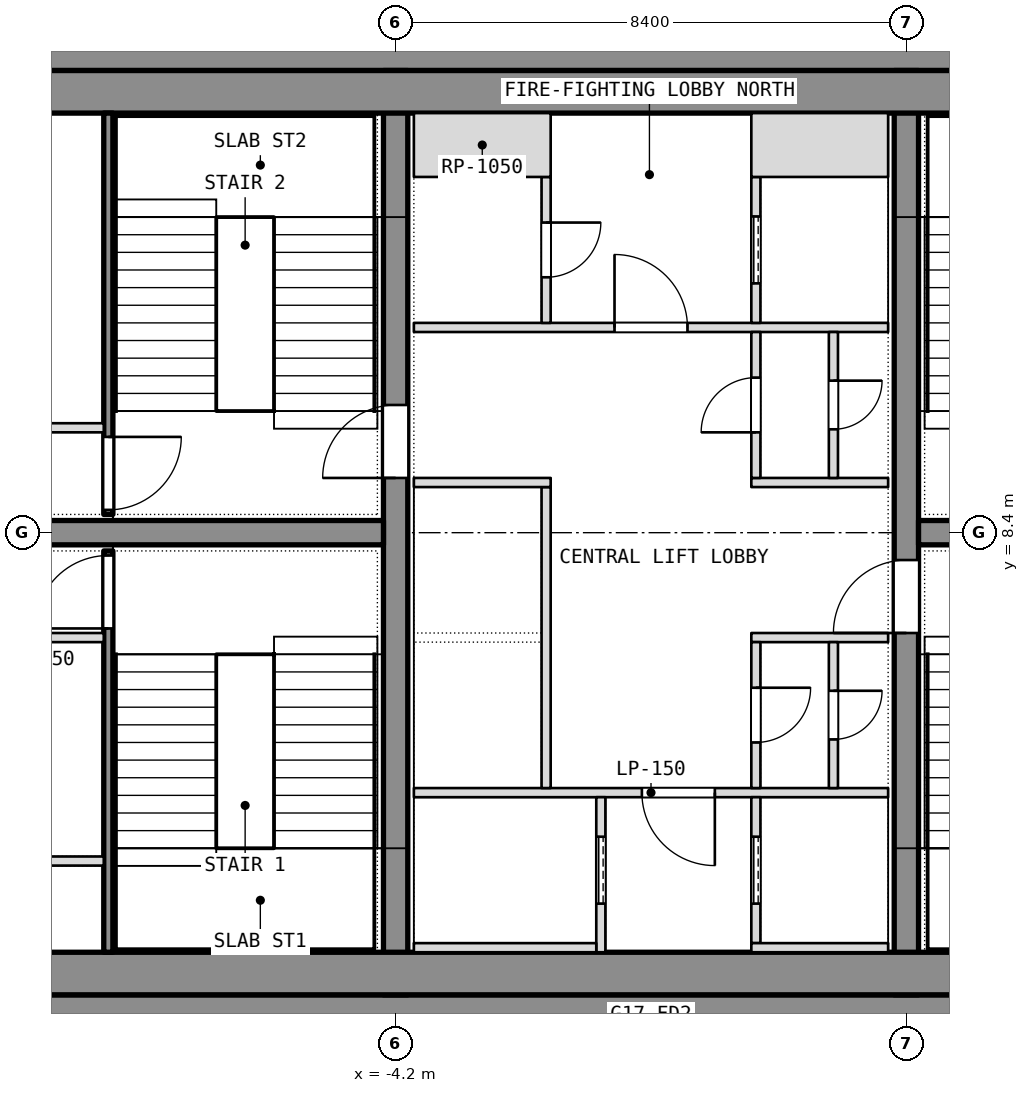
"""IFC4 building model, lengths in metres.
Left out: names, types, materials, properties, quantities, classifications, styles, units other than length and angle.
Written with IfcOpenShell. Run it as: python <this file> out.ifc"""

import sys

from ifc_helpers import new_model, si_unit, direction, frame, frame_2d, origin, place, context, subcontext, project, spatial, rectangle, extrude, element, fill, save


model = new_model("IFC4")
c1 = context("Model", 3, precision=1e-05, world=origin(), true_north=direction((0.0, 1.0)))
c2 = subcontext(c1, "Body", "Model", "MODEL_VIEW")
j1 = project(units=[si_unit("LENGTHUNIT", "METRE"), si_unit("PLANEANGLEUNIT", "RADIAN")], contexts=[c1])
p1 = place(None, origin())
s1 = spatial("IfcSite", under=j1, at=p1, CompositionType="ELEMENT")
p2 = place(p1, origin())
s2 = spatial("IfcBuilding", under=s1, at=p2, CompositionType="ELEMENT")
p3 = place(p2, frame((0.0, 0.0, 209.3)))
s3 = spatial("IfcBuildingStorey", under=s2, at=p3, CompositionType="ELEMENT", Elevation=209.3)
for number, where, z_axis, x_axis in (
    (1, (-11.1, 0.4, 0.0), (0.0, 0.0, 1.0), (1.0, 0.0, 0.0)),
    (2, (-11.1, 16.4, 0.0), (0.0, 0.0, 1.0), (1.0, 0.0, 0.0)),
):
    element("IfcWall", number, at=place(p3, frame(where, z_axis=z_axis, x_axis=x_axis)), inside=s3, PredefinedType="SHEAR", context=c2, shape_type="SweptSolid", body=[
        extrude(rectangle(XDim=22.2, YDim=0.8, at=frame_2d((11.1, 0.0))), origin(), (0.0, 0.0, 1.0), 3.6),
    ])
p4 = place(p3, frame((-4.2, 0.8, 0.0), z_axis=(0.0, 0.0, 1.0), x_axis=(0.0, 1.0, 0.0)))
e3 = element("IfcWall", 3, at=p4, inside=s3, PredefinedType="SHEAR", context=c2, shape_type="SweptSolid", body=[
    extrude(rectangle(XDim=15.2, YDim=0.4, at=frame_2d((7.6, 0.0))), origin(), (0.0, 0.0, 1.0), 3.6),
])
p5 = place(p4, frame((8.5, 0.0, 0.0)))
e4 = element("IfcOpeningElement", 4, at=p5, cuts=e3, PredefinedType="OPENING", context=c2, shape_type="SweptSolid", body=[
    extrude(rectangle(XDim=1.2, YDim=2.1, at=frame_2d((0.6, 1.05))), frame((0.0, 0.2, 0.0), z_axis=(0.0, -1.0, 0.0), x_axis=(1.0, 0.0, 0.0)), (0.0, 0.0, 1.0), 0.4),
])
p6 = place(p3, frame((4.2, 0.8, 0.0), z_axis=(0.0, 0.0, 1.0), x_axis=(0.0, 1.0, 0.0)))
e5 = element("IfcWall", 5, at=p6, inside=s3, PredefinedType="SHEAR", context=c2, shape_type="SweptSolid", body=[
    extrude(rectangle(XDim=15.2, YDim=0.4, at=frame_2d((7.6, 0.0))), origin(), (0.0, 0.0, 1.0), 3.6),
])
p7 = place(p6, frame((5.95, 0.0, 0.0)))
e6 = element("IfcOpeningElement", 6, at=p7, cuts=e5, PredefinedType="OPENING", context=c2, shape_type="SweptSolid", body=[
    extrude(rectangle(XDim=1.2, YDim=2.1, at=frame_2d((0.6, 1.05))), frame((0.0, 0.2, 0.0), z_axis=(0.0, -1.0, 0.0), x_axis=(1.0, 0.0, 0.0)), (0.0, 0.0, 1.0), 0.4),
])
for number, where, z_axis, x_axis in (
    (7, (-11.1, 8.4, 0.0), (0.0, 0.0, 1.0), (1.0, 0.0, 0.0)),
    (8, (4.4, 8.4, 0.0), (0.0, 0.0, 1.0), (1.0, 0.0, 0.0)),
):
    element("IfcWall", number, at=place(p3, frame(where, z_axis=z_axis, x_axis=x_axis)), inside=s3, PredefinedType="SHEAR", context=c2, shape_type="SweptSolid", body=[
        extrude(rectangle(XDim=6.7, YDim=0.4, at=frame_2d((3.35, 0.0))), origin(), (0.0, 0.0, 1.0), 3.6),
    ])
for number, where, z_axis, x_axis in (
    (9, (-11.1, 1.15, 0.0), (0.0, 0.0, 1.0), (1.0, 0.0, 0.0)),
    (10, (-11.1, 15.65, 0.0), (0.0, 0.0, 1.0), (1.0, 0.0, 0.0)),
):
    element("IfcWall", number, at=place(p3, frame(where, z_axis=z_axis, x_axis=x_axis)), inside=s3, PredefinedType="PARTITIONING", context=c2, shape_type="SweptSolid", body=[
        extrude(rectangle(XDim=22.2, YDim=0.7, at=frame_2d((11.1, 0.0))), origin(), (0.0, 0.0, 1.0), 3.34),
    ])
p8 = place(p3, frame((-8.925, 1.5, 0.0), z_axis=(0.0, 0.0, 1.0), x_axis=(0.0, 1.0, 0.0)))
e11 = element("IfcWall", 11, at=p8, inside=s3, PredefinedType="SHEAR", context=c2, shape_type="SweptSolid", body=[
    extrude(rectangle(XDim=6.6, YDim=0.15, at=frame_2d((3.3, 0.0))), origin(), (0.0, 0.0, 1.0), 3.34),
])
p9 = place(p8, frame((5.325, 0.0, 0.0)))
e12 = element("IfcOpeningElement", 12, at=p9, cuts=e11, PredefinedType="OPENING", context=c2, shape_type="SweptSolid", body=[
    extrude(rectangle(XDim=1.2, YDim=2.1, at=frame_2d((0.6, 1.05))), frame((0.0, 0.075, 0.0), z_axis=(0.0, -1.0, 0.0), x_axis=(1.0, 0.0, 0.0)), (0.0, 0.0, 1.0), 0.15),
])
for number, where, z_axis, x_axis in (
    (13, (-11.1, 6.675, 0.0), (0.0, 0.0, 1.0), (1.0, 0.0, 0.0)),
    (14, (-11.1, 3.0, 0.0), (0.0, 0.0, 1.0), (1.0, 0.0, 0.0)),
):
    element("IfcWall", number, at=place(p3, frame(where, z_axis=z_axis, x_axis=x_axis)), inside=s3, PredefinedType="PARTITIONING", context=c2, shape_type="SweptSolid", body=[
        extrude(rectangle(XDim=2.1, YDim=0.15, at=frame_2d((1.05, 0.0))), origin(), (0.0, 0.0, 1.0), 3.34),
    ])
p10 = place(p3, frame((-8.925, 8.7, 0.0), z_axis=(0.0, 0.0, 1.0), x_axis=(0.0, 1.0, 0.0)))
e15 = element("IfcWall", 15, at=p10, inside=s3, PredefinedType="SHEAR", context=c2, shape_type="SweptSolid", body=[
    extrude(rectangle(XDim=6.6, YDim=0.15, at=frame_2d((3.3, 0.0))), origin(), (0.0, 0.0, 1.0), 3.34),
])
p11 = place(p10, frame((0.075, 0.0, 0.0)))
e16 = element("IfcOpeningElement", 16, at=p11, cuts=e15, PredefinedType="OPENING", context=c2, shape_type="SweptSolid", body=[
    extrude(rectangle(XDim=1.2, YDim=2.1, at=frame_2d((0.6, 1.05))), frame((0.0, 0.075, 0.0), z_axis=(0.0, -1.0, 0.0), x_axis=(1.0, 0.0, 0.0)), (0.0, 0.0, 1.0), 0.15),
])
p12 = place(p3, frame((-11.1, 10.125, 0.0), z_axis=(0.0, 0.0, 1.0), x_axis=(1.0, 0.0, 0.0)))
e17 = element("IfcWall", 17, at=p12, inside=s3, PredefinedType="PARTITIONING", context=c2, shape_type="SweptSolid", body=[
    extrude(rectangle(XDim=2.1, YDim=0.15, at=frame_2d((1.05, 0.0))), origin(), (0.0, 0.0, 1.0), 3.34),
])
p13 = place(p3, frame((-3.9, 4.125, 0.0), z_axis=(0.0, 0.0, 1.0), x_axis=(1.0, 0.0, 0.0)))
e18 = element("IfcWall", 18, at=p13, inside=s3, PredefinedType="PARTITIONING", context=c2, shape_type="SweptSolid", body=[
    extrude(rectangle(XDim=7.8, YDim=0.15, at=frame_2d((3.9, 0.0))), origin(), (0.0, 0.0, 1.0), 3.34),
])
p14 = place(p13, frame((3.75, 0.0, 0.0)))
e19 = element("IfcOpeningElement", 19, at=p14, cuts=e18, PredefinedType="OPENING", context=c2, shape_type="SweptSolid", body=[
    extrude(rectangle(XDim=1.2, YDim=2.1, at=frame_2d((0.6, 1.05))), frame((0.0, 0.075, 0.0), z_axis=(0.0, -1.0, 0.0), x_axis=(1.0, 0.0, 0.0)), (0.0, 0.0, 1.0), 0.15),
])
p15 = place(p3, frame((-3.9, 11.775, 0.0), z_axis=(0.0, 0.0, 1.0), x_axis=(1.0, 0.0, 0.0)))
e20 = element("IfcWall", 20, at=p15, inside=s3, PredefinedType="PARTITIONING", context=c2, shape_type="SweptSolid", body=[
    extrude(rectangle(XDim=7.8, YDim=0.15, at=frame_2d((3.9, 0.0))), origin(), (0.0, 0.0, 1.0), 3.34),
])
p16 = place(p15, frame((3.3, 0.0, 0.0)))
e21 = element("IfcOpeningElement", 21, at=p16, cuts=e20, PredefinedType="OPENING", context=c2, shape_type="SweptSolid", body=[
    extrude(rectangle(XDim=1.2, YDim=2.1, at=frame_2d((0.6, 1.05))), frame((0.0, 0.075, 0.0), z_axis=(0.0, -1.0, 0.0), x_axis=(1.0, 0.0, 0.0)), (0.0, 0.0, 1.0), 0.15),
])
p17 = place(p3, frame((-0.825, 1.5, 0.0), z_axis=(0.0, 0.0, 1.0), x_axis=(0.0, 1.0, 0.0)))
e22 = element("IfcWall", 22, at=p17, inside=s3, PredefinedType="SHEAR", context=c2, shape_type="SweptSolid", body=[
    extrude(rectangle(XDim=2.55, YDim=0.15, at=frame_2d((1.275, 0.0))), origin(), (0.0, 0.0, 1.0), 3.6),
])
p18 = place(p17, frame((0.8, 0.0, 0.0)))
e23 = element("IfcOpeningElement", 23, at=p18, cuts=e22, PredefinedType="OPENING", context=c2, shape_type="SweptSolid", body=[
    extrude(rectangle(XDim=1.1, YDim=2.1, at=frame_2d((0.55, 1.05))), frame((0.0, 0.075, 0.0), z_axis=(0.0, -1.0, 0.0), x_axis=(1.0, 0.0, 0.0)), (0.0, 0.0, 1.0), 0.15),
])
p19 = place(p3, frame((-3.9, 1.575, 0.0), z_axis=(0.0, 0.0, 1.0), x_axis=(1.0, 0.0, 0.0)))
e24 = element("IfcWall", 24, at=p19, inside=s3, PredefinedType="SHEAR", context=c2, shape_type="SweptSolid", body=[
    extrude(rectangle(XDim=3.0, YDim=0.15, at=frame_2d((1.5, 0.0))), origin(), (0.0, 0.0, 1.0), 3.6),
])
p20 = place(p3, frame((-1.725, 4.2, 0.0), z_axis=(0.0, 0.0, 1.0), x_axis=(0.0, 1.0, 0.0)))
e25 = element("IfcWall", 25, at=p20, inside=s3, PredefinedType="SHEAR", context=c2, shape_type="SweptSolid", body=[
    extrude(rectangle(XDim=4.95, YDim=0.15, at=frame_2d((2.475, 0.0))), origin(), (0.0, 0.0, 1.0), 3.6),
])
p21 = place(p3, frame((-3.9, 9.225, 0.0), z_axis=(0.0, 0.0, 1.0), x_axis=(1.0, 0.0, 0.0)))
e26 = element("IfcWall", 26, at=p21, inside=s3, PredefinedType="SHEAR", context=c2, shape_type="SweptSolid", body=[
    extrude(rectangle(XDim=2.25, YDim=0.15, at=frame_2d((1.125, 0.0))), origin(), (0.0, 0.0, 1.0), 3.6),
])
p22 = place(p3, frame((-1.725, 11.85, 0.0), z_axis=(0.0, 0.0, 1.0), x_axis=(0.0, 1.0, 0.0)))
e27 = element("IfcWall", 27, at=p22, inside=s3, PredefinedType="PARTITIONING", context=c2, shape_type="SweptSolid", body=[
    extrude(rectangle(XDim=2.4, YDim=0.15, at=frame_2d((1.2, 0.0))), origin(), (0.0, 0.0, 1.0), 3.34),
])
p23 = place(p22, frame((0.75, 0.0, 0.0)))
e28 = element("IfcOpeningElement", 28, at=p23, cuts=e27, PredefinedType="OPENING", context=c2, shape_type="SweptSolid", body=[
    extrude(rectangle(XDim=0.9, YDim=2.1, at=frame_2d((0.45, 1.05))), frame((0.0, 0.075, 0.0), z_axis=(0.0, -1.0, 0.0), x_axis=(1.0, 0.0, 0.0)), (0.0, 0.0, 1.0), 0.15),
])
p24 = place(p3, frame((-3.9, 14.775, 0.0), z_axis=(0.0, 0.0, 1.0), x_axis=(1.0, 0.0, 0.0)))
e29 = element("IfcWall", 29, at=p24, inside=s3, PredefinedType="PARTITIONING", context=c2, shape_type="SweptSolid", body=[
    extrude(rectangle(XDim=2.25, YDim=1.05, at=frame_2d((1.125, 0.0))), origin(), (0.0, 0.0, 1.0), 3.34),
])
p25 = place(p3, frame((1.725, 1.65, 0.0), z_axis=(0.0, 0.0, 1.0), x_axis=(0.0, 1.0, 0.0)))
e30 = element("IfcWall", 30, at=p25, inside=s3, PredefinedType="SHEAR", context=c2, shape_type="SweptSolid", body=[
    extrude(rectangle(XDim=2.4, YDim=0.15, at=frame_2d((1.2, 0.0))), origin(), (0.0, 0.0, 1.0), 3.6),
])
p26 = place(p25, frame((0.65, 0.0, 0.0)))
e31 = element("IfcOpeningElement", 31, at=p26, cuts=e30, PredefinedType="OPENING", context=c2, shape_type="SweptSolid", body=[
    extrude(rectangle(XDim=1.1, YDim=2.1, at=frame_2d((0.55, 1.05))), frame((0.0, 0.075, 0.0), z_axis=(0.0, -1.0, 0.0), x_axis=(1.0, 0.0, 0.0)), (0.0, 0.0, 1.0), 0.15),
])
p27 = place(p3, frame((1.65, 1.575, 0.0), z_axis=(0.0, 0.0, 1.0), x_axis=(1.0, 0.0, 0.0)))
e32 = element("IfcWall", 32, at=p27, inside=s3, PredefinedType="SHEAR", context=c2, shape_type="SweptSolid", body=[
    extrude(rectangle(XDim=2.25, YDim=0.15, at=frame_2d((1.125, 0.0))), origin(), (0.0, 0.0, 1.0), 3.6),
])
p28 = place(p3, frame((1.725, 11.85, 0.0), z_axis=(0.0, 0.0, 1.0), x_axis=(0.0, 1.0, 0.0)))
e33 = element("IfcWall", 33, at=p28, inside=s3, PredefinedType="SHEAR", context=c2, shape_type="SweptSolid", body=[
    extrude(rectangle(XDim=2.4, YDim=0.15, at=frame_2d((1.2, 0.0))), origin(), (0.0, 0.0, 1.0), 3.6),
])
p29 = place(p28, frame((0.65, 0.0, 0.0)))
e34 = element("IfcOpeningElement", 34, at=p29, cuts=e33, PredefinedType="OPENING", context=c2, shape_type="SweptSolid", body=[
    extrude(rectangle(XDim=1.1, YDim=2.1, at=frame_2d((0.55, 1.05))), frame((0.0, 0.075, 0.0), z_axis=(0.0, -1.0, 0.0), x_axis=(1.0, 0.0, 0.0)), (0.0, 0.0, 1.0), 0.15),
])
p30 = place(p3, frame((1.65, 14.775, 0.0), z_axis=(0.0, 0.0, 1.0), x_axis=(1.0, 0.0, 0.0)))
e35 = element("IfcWall", 35, at=p30, inside=s3, PredefinedType="SHEAR", context=c2, shape_type="SweptSolid", body=[
    extrude(rectangle(XDim=2.25, YDim=1.05, at=frame_2d((1.125, 0.0))), origin(), (0.0, 0.0, 1.0), 3.6),
])
for number, where, z_axis, x_axis in (
    (36, (1.65, 6.675, 0.0), (0.0, 0.0, 1.0), (1.0, 0.0, 0.0)),
    (37, (1.65, 9.225, 0.0), (0.0, 0.0, 1.0), (1.0, 0.0, 0.0)),
):
    element("IfcWall", number, at=place(p3, frame(where, z_axis=z_axis, x_axis=x_axis)), inside=s3, PredefinedType="PARTITIONING", context=c2, shape_type="SweptSolid", body=[
        extrude(rectangle(XDim=2.25, YDim=0.15, at=frame_2d((1.125, 0.0))), origin(), (0.0, 0.0, 1.0), 3.34),
    ])
p31 = place(p3, frame((1.725, 4.2, 0.0), z_axis=(0.0, 0.0, 1.0), x_axis=(0.0, 1.0, 0.0)))
e38 = element("IfcWall", 38, at=p31, inside=s3, PredefinedType="PARTITIONING", context=c2, shape_type="SweptSolid", body=[
    extrude(rectangle(XDim=2.4, YDim=0.15, at=frame_2d((1.2, 0.0))), origin(), (0.0, 0.0, 1.0), 3.34),
])
p32 = place(p31, frame((0.75, 0.0, 0.0)))
e39 = element("IfcOpeningElement", 39, at=p32, cuts=e38, PredefinedType="OPENING", context=c2, shape_type="SweptSolid", body=[
    extrude(rectangle(XDim=0.9, YDim=2.1, at=frame_2d((0.45, 1.05))), frame((0.0, 0.075, 0.0), z_axis=(0.0, -1.0, 0.0), x_axis=(1.0, 0.0, 0.0)), (0.0, 0.0, 1.0), 0.15),
])
p33 = place(p3, frame((1.725, 9.3, 0.0), z_axis=(0.0, 0.0, 1.0), x_axis=(0.0, 1.0, 0.0)))
e40 = element("IfcWall", 40, at=p33, inside=s3, PredefinedType="PARTITIONING", context=c2, shape_type="SweptSolid", body=[
    extrude(rectangle(XDim=2.4, YDim=0.15, at=frame_2d((1.2, 0.0))), origin(), (0.0, 0.0, 1.0), 3.34),
])
p34 = place(p33, frame((0.75, 0.0, 0.0)))
e41 = element("IfcOpeningElement", 41, at=p34, cuts=e40, PredefinedType="OPENING", context=c2, shape_type="SweptSolid", body=[
    extrude(rectangle(XDim=0.9, YDim=2.1, at=frame_2d((0.45, 1.05))), frame((0.0, 0.075, 0.0), z_axis=(0.0, -1.0, 0.0), x_axis=(1.0, 0.0, 0.0)), (0.0, 0.0, 1.0), 0.15),
])
p35 = place(p3, frame((3.0, 4.2, 0.0), z_axis=(0.0, 0.0, 1.0), x_axis=(0.0, 1.0, 0.0)))
e42 = element("IfcWall", 42, at=p35, inside=s3, PredefinedType="PARTITIONING", context=c2, shape_type="SweptSolid", body=[
    extrude(rectangle(XDim=2.4, YDim=0.15, at=frame_2d((1.2, 0.0))), origin(), (0.0, 0.0, 1.0), 3.34),
])
p36 = place(p35, frame((0.8, 0.0, 0.0)))
e43 = element("IfcOpeningElement", 43, at=p36, cuts=e42, PredefinedType="OPENING", context=c2, shape_type="SweptSolid", body=[
    extrude(rectangle(XDim=0.8, YDim=2.1, at=frame_2d((0.4, 1.05))), frame((0.0, 0.075, 0.0), z_axis=(0.0, -1.0, 0.0), x_axis=(1.0, 0.0, 0.0)), (0.0, 0.0, 1.0), 0.15),
])
p37 = place(p3, frame((3.0, 9.3, 0.0), z_axis=(0.0, 0.0, 1.0), x_axis=(0.0, 1.0, 0.0)))
e44 = element("IfcWall", 44, at=p37, inside=s3, PredefinedType="PARTITIONING", context=c2, shape_type="SweptSolid", body=[
    extrude(rectangle(XDim=2.4, YDim=0.15, at=frame_2d((1.2, 0.0))), origin(), (0.0, 0.0, 1.0), 3.34),
])
p38 = place(p37, frame((0.8, 0.0, 0.0)))
e45 = element("IfcOpeningElement", 45, at=p38, cuts=e44, PredefinedType="OPENING", context=c2, shape_type="SweptSolid", body=[
    extrude(rectangle(XDim=0.8, YDim=2.1, at=frame_2d((0.4, 1.05))), frame((0.0, 0.075, 0.0), z_axis=(0.0, -1.0, 0.0), x_axis=(1.0, 0.0, 0.0)), (0.0, 0.0, 1.0), 0.15),
])
p39 = place(p9, origin())
e46 = element("IfcDoor", 46, at=p39, inside=s3, OperationType="SINGLE_SWING_LEFT", PredefinedType="DOOR", context=c2, shape_type="SweptSolid", body=[
    extrude(rectangle(XDim=1.2, YDim=2.1, at=frame_2d((0.6, 1.05))), frame((0.0, 0.025, 0.0), z_axis=(0.0, -1.0, 0.0), x_axis=(1.0, 0.0, 0.0)), (0.0, 0.0, 1.0), 0.05),
])
fill(e12, e46)
p40 = place(p11, origin())
e47 = element("IfcDoor", 47, at=p40, inside=s3, OperationType="SINGLE_SWING_LEFT", PredefinedType="DOOR", context=c2, shape_type="SweptSolid", body=[
    extrude(rectangle(XDim=1.2, YDim=2.1, at=frame_2d((0.6, 1.05))), frame((0.0, 0.025, 0.0), z_axis=(0.0, -1.0, 0.0), x_axis=(1.0, 0.0, 0.0)), (0.0, 0.0, 1.0), 0.05),
])
fill(e16, e47)
p41 = place(p32, origin())
e48 = element("IfcDoor", 48, at=p41, inside=s3, OperationType="SINGLE_SWING_LEFT", PredefinedType="DOOR", context=c2, shape_type="SweptSolid", body=[
    extrude(rectangle(XDim=0.9, YDim=2.1, at=frame_2d((0.45, 1.05))), frame((0.0, 0.025, 0.0), z_axis=(0.0, -1.0, 0.0), x_axis=(1.0, 0.0, 0.0)), (0.0, 0.0, 1.0), 0.05),
])
fill(e39, e48)
p42 = place(p36, origin())
e49 = element("IfcDoor", 49, at=p42, inside=s3, OperationType="SINGLE_SWING_LEFT", PredefinedType="DOOR", context=c2, shape_type="SweptSolid", body=[
    extrude(rectangle(XDim=0.8, YDim=2.1, at=frame_2d((0.4, 1.05))), frame((0.0, 0.025, 0.0), z_axis=(0.0, -1.0, 0.0), x_axis=(1.0, 0.0, 0.0)), (0.0, 0.0, 1.0), 0.05),
])
fill(e43, e49)
p43 = place(p34, origin())
e50 = element("IfcDoor", 50, at=p43, inside=s3, OperationType="SINGLE_SWING_LEFT", PredefinedType="DOOR", context=c2, shape_type="SweptSolid", body=[
    extrude(rectangle(XDim=0.9, YDim=2.1, at=frame_2d((0.45, 1.05))), frame((0.0, 0.025, 0.0), z_axis=(0.0, -1.0, 0.0), x_axis=(1.0, 0.0, 0.0)), (0.0, 0.0, 1.0), 0.05),
])
fill(e41, e50)
p44 = place(p38, origin())
e51 = element("IfcDoor", 51, at=p44, inside=s3, OperationType="SINGLE_SWING_LEFT", PredefinedType="DOOR", context=c2, shape_type="SweptSolid", body=[
    extrude(rectangle(XDim=0.8, YDim=2.1, at=frame_2d((0.4, 1.05))), frame((0.0, 0.025, 0.0), z_axis=(0.0, -1.0, 0.0), x_axis=(1.0, 0.0, 0.0)), (0.0, 0.0, 1.0), 0.05),
])
fill(e45, e51)
p45 = place(p18, origin())
e52 = element("IfcDoor", 52, at=p45, inside=s3, OperationType="SLIDING_TO_LEFT", PredefinedType="DOOR", context=c2, shape_type="SweptSolid", body=[
    extrude(rectangle(XDim=1.1, YDim=2.1, at=frame_2d((0.55, 1.05))), frame((0.0, 0.025, 0.0), z_axis=(0.0, -1.0, 0.0), x_axis=(1.0, 0.0, 0.0)), (0.0, 0.0, 1.0), 0.05),
])
fill(e23, e52)
p46 = place(p26, origin())
e53 = element("IfcDoor", 53, at=p46, inside=s3, OperationType="SLIDING_TO_LEFT", PredefinedType="DOOR", context=c2, shape_type="SweptSolid", body=[
    extrude(rectangle(XDim=1.1, YDim=2.1, at=frame_2d((0.55, 1.05))), frame((0.0, 0.025, 0.0), z_axis=(0.0, -1.0, 0.0), x_axis=(1.0, 0.0, 0.0)), (0.0, 0.0, 1.0), 0.05),
])
fill(e31, e53)
p47 = place(p29, origin())
e54 = element("IfcDoor", 54, at=p47, inside=s3, OperationType="SLIDING_TO_LEFT", PredefinedType="DOOR", context=c2, shape_type="SweptSolid", body=[
    extrude(rectangle(XDim=1.1, YDim=2.1, at=frame_2d((0.55, 1.05))), frame((0.0, 0.025, 0.0), z_axis=(0.0, -1.0, 0.0), x_axis=(1.0, 0.0, 0.0)), (0.0, 0.0, 1.0), 0.05),
])
fill(e34, e54)
p48 = place(p14, origin())
e55 = element("IfcDoor", 55, at=p48, inside=s3, OperationType="SINGLE_SWING_LEFT", PredefinedType="DOOR", context=c2, shape_type="SweptSolid", body=[
    extrude(rectangle(XDim=1.2, YDim=2.1, at=frame_2d((0.6, 1.05))), frame((0.0, 0.025, 0.0), z_axis=(0.0, -1.0, 0.0), x_axis=(1.0, 0.0, 0.0)), (0.0, 0.0, 1.0), 0.05),
])
fill(e19, e55)
p49 = place(p16, origin())
e56 = element("IfcDoor", 56, at=p49, inside=s3, OperationType="SINGLE_SWING_LEFT", PredefinedType="DOOR", context=c2, shape_type="SweptSolid", body=[
    extrude(rectangle(XDim=1.2, YDim=2.1, at=frame_2d((0.6, 1.05))), frame((0.0, 0.025, 0.0), z_axis=(0.0, -1.0, 0.0), x_axis=(1.0, 0.0, 0.0)), (0.0, 0.0, 1.0), 0.05),
])
fill(e21, e56)
p50 = place(p23, origin())
e57 = element("IfcDoor", 57, at=p50, inside=s3, OperationType="SINGLE_SWING_LEFT", PredefinedType="DOOR", context=c2, shape_type="SweptSolid", body=[
    extrude(rectangle(XDim=0.9, YDim=2.1, at=frame_2d((0.45, 1.05))), frame((0.0, 0.025, 0.0), z_axis=(0.0, -1.0, 0.0), x_axis=(1.0, 0.0, 0.0)), (0.0, 0.0, 1.0), 0.05),
])
fill(e28, e57)
p51 = place(p5, origin())
e58 = element("IfcDoor", 58, at=p51, inside=s3, OperationType="SINGLE_SWING_LEFT", PredefinedType="DOOR", context=c2, shape_type="SweptSolid", body=[
    extrude(rectangle(XDim=1.2, YDim=2.1, at=frame_2d((0.6, 1.05))), frame((0.0, 0.025, 0.0), z_axis=(0.0, -1.0, 0.0), x_axis=(1.0, 0.0, 0.0)), (0.0, 0.0, 1.0), 0.05),
])
fill(e4, e58)
p52 = place(p7, origin())
e59 = element("IfcDoor", 59, at=p52, inside=s3, OperationType="SINGLE_SWING_LEFT", PredefinedType="DOOR", context=c2, shape_type="SweptSolid", body=[
    extrude(rectangle(XDim=1.2, YDim=2.1, at=frame_2d((0.6, 1.05))), frame((0.0, 0.025, 0.0), z_axis=(0.0, -1.0, 0.0), x_axis=(1.0, 0.0, 0.0)), (0.0, 0.0, 1.0), 0.05),
])
fill(e6, e59)
save(model, sys.argv[1])
